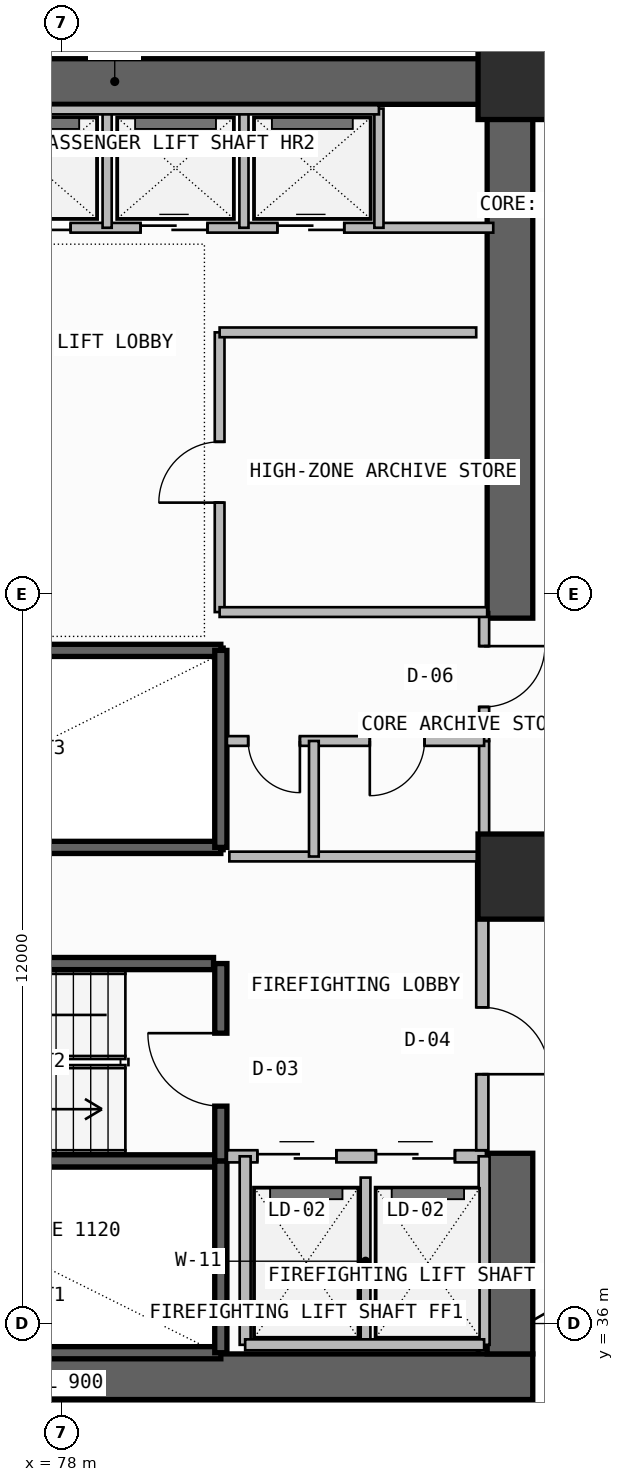
"""IFC4 building model, lengths in metres.
Left out: names, types, materials, properties, quantities, classifications, styles, units other than length and angle.
Written with IfcOpenShell. Run it as: python <this file> out.ifc"""

import sys

from ifc_helpers import new_model, si_unit, direction, frame, frame_2d, origin, origin_2d, place, context, subcontext, project, spatial, rectangle, extrude, element, fill, save


model = new_model("IFC4")
c1 = context("Model", 3, precision=1e-05, world=origin(), true_north=direction((0.0, 1.0)))
c2 = subcontext(c1, "Body", "Model", "MODEL_VIEW")
j1 = project(units=[si_unit("LENGTHUNIT", "METRE"), si_unit("PLANEANGLEUNIT", "RADIAN")], contexts=[c1])
p1 = place(None, origin())
s1 = spatial("IfcSite", under=j1, at=p1, CompositionType="ELEMENT")
p2 = place(p1, origin())
s2 = spatial("IfcBuilding", under=s1, at=p2, CompositionType="ELEMENT")
p3 = place(p2, frame((0.0, 0.0, 214.98)))
s3 = spatial("IfcBuildingStorey", under=s2, at=p3, CompositionType="ELEMENT", Elevation=214.98)
p4 = place(p3, frame((72.15, 35.125, -0.26), z_axis=(0.0, 0.0, 1.0), x_axis=(1.0, 0.0, 0.0)))
e1 = element("IfcWall", 1, at=p4, inside=s3, PredefinedType="SHEAR", context=c2, shape_type="SweptSolid", body=[
    extrude(rectangle(XDim=13.6, YDim=0.75, at=frame_2d((6.8, 0.0))), origin(), (0.0, 0.0, 1.0), 3.52),
])
p5 = place(p3, frame((85.375, 35.5, -0.26), z_axis=(0.0, 0.0, 1.0), x_axis=(0.0, 1.0, 0.0)))
e2 = element("IfcWall", 2, at=p5, inside=s3, PredefinedType="SHEAR", context=c2, shape_type="SweptSolid", body=[
    extrude(rectangle(XDim=3.3, YDim=0.75, at=frame_2d((1.65, 0.0))), origin(), (0.0, 0.0, 1.0), 3.52),
])
p6 = place(p3, frame((72.0, 56.425, -0.26), z_axis=(0.0, 0.0, 1.0), x_axis=(1.0, 0.0, 0.0)))
e3 = element("IfcWall", 3, at=p6, inside=s3, PredefinedType="SHEAR", context=c2, shape_type="SweptSolid", body=[
    extrude(rectangle(XDim=13.75, YDim=0.75, at=frame_2d((6.875, 0.0))), origin(), (0.0, 0.0, 1.0), 3.52),
])
p7 = place(p3, frame((85.375, 47.6, -0.26), z_axis=(0.0, 0.0, 1.0), x_axis=(0.0, 1.0, 0.0)))
e4 = element("IfcWall", 4, at=p7, inside=s3, PredefinedType="SHEAR", context=c2, shape_type="SweptSolid", body=[
    extrude(rectangle(XDim=8.45, YDim=0.75, at=frame_2d((4.225, 0.0))), origin(), (0.0, 0.0, 1.0), 3.52),
])
for number, where, z_axis, x_axis in (
    (5, (85.55, 43.35, 0.0), (0.0, 0.0, 1.0), (1.0, 0.0, 0.0)),
    (6, (85.55, 56.5, 0.0), (0.0, 0.0, 1.0), (1.0, 0.0, 0.0)),
):
    element("IfcColumn", number, at=place(p3, frame(where, z_axis=z_axis, x_axis=x_axis)), inside=s3, PredefinedType="COLUMN", context=c2, shape_type="SweptSolid", body=[
        extrude(rectangle(XDim=1.4, YDim=1.4, at=origin_2d()), origin(), (0.0, 0.0, 1.0), 3.52),
    ])
p8 = place(p3, frame((116.396, 56.722, 0.0), z_axis=(0.0, 0.0, 1.0), x_axis=(-0.977936620644, 0.208901809478, 0.0)))
e7 = element("IfcWall", 7, at=p8, inside=s3, PredefinedType="PARAPET", context=c2, shape_type="SweptSolid", body=[
    extrude(rectangle(XDim=31.685, YDim=0.2, at=frame_2d((15.843, 0.0))), origin(), (0.0, 0.0, 1.0), 1.15),
])
for number, where, z_axis, x_axis in (
    (8, (72.92, 35.52, -0.26), (0.0, 0.0, 1.0), (1.0, 0.0, 0.0)),
    (9, (72.92, 38.675, -0.26), (0.0, 0.0, 1.0), (1.0, 0.0, 0.0)),
):
    element("IfcWall", number, at=place(p3, frame(where, z_axis=z_axis, x_axis=x_axis)), inside=s3, PredefinedType="SOLIDWALL", context=c2, shape_type="SweptSolid", body=[
        extrude(rectangle(XDim=7.7, YDim=0.2, at=frame_2d((3.85, 0.0))), origin(), (0.0, 0.0, 1.0), 3.52),
    ])
p9 = place(p3, frame((80.62, 35.52, -0.26), z_axis=(0.0, 0.0, 1.0), x_axis=(0.0, 1.0, 0.0)))
e10 = element("IfcWall", 10, at=p9, inside=s3, PredefinedType="SOLIDWALL", context=c2, shape_type="SweptSolid", body=[
    extrude(rectangle(XDim=3.155, YDim=0.2, at=frame_2d((1.578, 0.0))), origin(), (0.0, 0.0, 1.0), 3.52),
])
p10 = place(p3, frame((80.62, 38.675, -0.26), z_axis=(0.0, 0.0, 1.0), x_axis=(0.0, 1.0, 0.0)))
e11 = element("IfcWall", 11, at=p10, inside=s3, PredefinedType="SOLIDWALL", context=c2, shape_type="SweptSolid", body=[
    extrude(rectangle(XDim=3.245, YDim=0.2, at=frame_2d((1.623, 0.0))), origin(), (0.0, 0.0, 1.0), 3.52),
])
p11 = place(p10, frame((0.9, 0.0, 0.26)))
e12 = element("IfcOpeningElement", 12, at=p11, cuts=e11, PredefinedType="OPENING", context=c2, shape_type="SweptSolid", body=[
    extrude(rectangle(XDim=1.2, YDim=2.2, at=frame_2d((0.6, 1.1))), frame((0.0, 0.11, 0.0), z_axis=(0.0, -1.0, 0.0), x_axis=(1.0, 0.0, 0.0)), (0.0, 0.0, 1.0), 0.22),
])
p12 = place(p3, frame((80.72, 38.75, 0.0), z_axis=(0.0, 0.0, 1.0), x_axis=(1.0, 0.0, 0.0)))
e13 = element("IfcWall", 13, at=p12, inside=s3, PredefinedType="SOLIDWALL", context=c2, shape_type="SweptSolid", body=[
    extrude(rectangle(XDim=4.26, YDim=0.2, at=frame_2d((2.13, 0.0))), origin(), (0.0, 0.0, 1.0), 3.26),
])
p13 = place(p12, frame((0.5, 0.0, 0.0)))
e14 = element("IfcOpeningElement", 14, at=p13, cuts=e13, PredefinedType="OPENING", context=c2, shape_type="SweptSolid", body=[
    extrude(rectangle(XDim=1.3, YDim=2.3, at=frame_2d((0.65, 1.15))), frame((0.0, 0.11, 0.0), z_axis=(0.0, -1.0, 0.0), x_axis=(1.0, 0.0, 0.0)), (0.0, 0.0, 1.0), 0.22),
])
p14 = place(p12, frame((2.45, 0.0, 0.0)))
e15 = element("IfcOpeningElement", 15, at=p14, cuts=e13, PredefinedType="OPENING", context=c2, shape_type="SweptSolid", body=[
    extrude(rectangle(XDim=1.3, YDim=2.3, at=frame_2d((0.65, 1.15))), frame((0.0, 0.11, 0.0), z_axis=(0.0, -1.0, 0.0), x_axis=(1.0, 0.0, 0.0)), (0.0, 0.0, 1.0), 0.22),
])
p15 = place(p3, frame((83.0, 35.65, 0.0), z_axis=(0.0, 0.0, 1.0), x_axis=(0.0, 1.0, 0.0)))
e16 = element("IfcWall", 16, at=p15, inside=s3, PredefinedType="PLUMBINGWALL", context=c2, shape_type="SweptSolid", body=[
    extrude(rectangle(XDim=2.75, YDim=0.16, at=frame_2d((1.375, 0.0))), origin(), (0.0, 0.0, 1.0), 3.26),
])
for number, where, z_axis, x_axis in (
    (17, (84.95, 35.65, 0.0), (0.0, 0.0, 1.0), (0.0, 1.0, 0.0)),
    (18, (81.02, 35.65, 0.0), (0.0, 0.0, 1.0), (0.0, 1.0, 0.0)),
):
    element("IfcWall", number, at=place(p3, frame(where, z_axis=z_axis, x_axis=x_axis)), inside=s3, PredefinedType="SOLIDWALL", context=c2, shape_type="SweptSolid", body=[
        extrude(rectangle(XDim=3.1, YDim=0.18, at=frame_2d((1.55, 0.0))), origin(), (0.0, 0.0, 1.0), 3.26),
    ])
p16 = place(p3, frame((81.02, 35.65, 0.0), z_axis=(0.0, 0.0, 1.0), x_axis=(1.0, 0.0, 0.0)))
e19 = element("IfcWall", 19, at=p16, inside=s3, PredefinedType="SOLIDWALL", context=c2, shape_type="SweptSolid", body=[
    extrude(rectangle(XDim=3.93, YDim=0.18, at=frame_2d((1.965, 0.0))), origin(), (0.0, 0.0, 1.0), 3.26),
])
p17 = place(p3, frame((84.92, 38.85, 0.0), z_axis=(0.0, 0.0, 1.0), x_axis=(0.0, 1.0, 0.0)))
e20 = element("IfcWall", 20, at=p17, inside=s3, PredefinedType="SOLIDWALL", context=c2, shape_type="SweptSolid", body=[
    extrude(rectangle(XDim=4.83, YDim=0.2, at=frame_2d((2.415, 0.0))), origin(), (0.0, 0.0, 1.0), 3.26),
])
p18 = place(p17, frame((1.25, 0.0, 0.0)))
e21 = element("IfcOpeningElement", 21, at=p18, cuts=e20, PredefinedType="OPENING", context=c2, shape_type="SweptSolid", body=[
    extrude(rectangle(XDim=1.1, YDim=2.2, at=frame_2d((0.55, 1.1))), frame((0.0, 0.11, 0.0), z_axis=(0.0, -1.0, 0.0), x_axis=(1.0, 0.0, 0.0)), (0.0, 0.0, 1.0), 0.22),
])
p19 = place(p3, frame((72.92, 41.92, -0.26), z_axis=(0.0, 0.0, 1.0), x_axis=(1.0, 0.0, 0.0)))
e22 = element("IfcWall", 22, at=p19, inside=s3, PredefinedType="SOLIDWALL", context=c2, shape_type="SweptSolid", body=[
    extrude(rectangle(XDim=7.58, YDim=0.2, at=frame_2d((3.79, 0.0))), origin(), (0.0, 0.0, 1.0), 3.52),
])
for number, where, z_axis, x_axis in (
    (23, (72.92, 43.83, -0.26), (0.0, 0.0, 1.0), (1.0, 0.0, 0.0)),
    (24, (72.92, 47.07, -0.26), (0.0, 0.0, 1.0), (1.0, 0.0, 0.0)),
):
    element("IfcWall", number, at=place(p3, frame(where, z_axis=z_axis, x_axis=x_axis)), inside=s3, PredefinedType="SOLIDWALL", context=c2, shape_type="SweptSolid", body=[
        extrude(rectangle(XDim=7.7, YDim=0.2, at=frame_2d((3.85, 0.0))), origin(), (0.0, 0.0, 1.0), 3.52),
    ])
p20 = place(p3, frame((80.62, 43.83, -0.26), z_axis=(0.0, 0.0, 1.0), x_axis=(0.0, 1.0, 0.0)))
e25 = element("IfcWall", 25, at=p20, inside=s3, PredefinedType="SOLIDWALL", context=c2, shape_type="SweptSolid", body=[
    extrude(rectangle(XDim=3.24, YDim=0.2, at=frame_2d((1.62, 0.0))), origin(), (0.0, 0.0, 1.0), 3.52),
])
p21 = place(p3, frame((84.95, 43.68, 0.0), z_axis=(0.0, 0.0, 1.0), x_axis=(0.0, 1.0, 0.0)))
e26 = element("IfcWall", 26, at=p21, inside=s3, PredefinedType="PLUMBINGWALL", context=c2, shape_type="SweptSolid", body=[
    extrude(rectangle(XDim=1.9, YDim=0.165, at=frame_2d((0.95, 0.0))), origin(), (0.0, 0.0, 1.0), 3.26),
])
p22 = place(p3, frame((84.95, 45.58, 0.0), z_axis=(0.0, 0.0, 1.0), x_axis=(0.0, 1.0, 0.0)))
e27 = element("IfcWall", 27, at=p22, inside=s3, PredefinedType="PARTITIONING", context=c2, shape_type="SweptSolid", body=[
    extrude(rectangle(XDim=2.12, YDim=0.165, at=frame_2d((1.06, 0.0))), origin(), (0.0, 0.0, 1.0), 3.26),
])
p23 = place(p22, frame((0.56, 0.0, 0.0)))
e28 = element("IfcOpeningElement", 28, at=p23, cuts=e27, PredefinedType="OPENING", context=c2, shape_type="SweptSolid", body=[
    extrude(rectangle(XDim=1.0, YDim=2.2, at=frame_2d((0.5, 1.1))), frame((0.0, 0.093, 0.0), z_axis=(0.0, -1.0, 0.0), x_axis=(1.0, 0.0, 0.0)), (0.0, 0.0, 1.0), 0.185),
])
p24 = place(p3, frame((80.72, 45.58, 0.0), z_axis=(0.0, 0.0, 1.0), x_axis=(1.0, 0.0, 0.0)))
e29 = element("IfcWall", 29, at=p24, inside=s3, PredefinedType="PLUMBINGWALL", context=c2, shape_type="SweptSolid", body=[
    extrude(rectangle(XDim=4.23, YDim=0.16, at=frame_2d((2.115, 0.0))), origin(), (0.0, 0.0, 1.0), 3.26),
])
p25 = place(p24, frame((0.35, 0.0, 0.0)))
e30 = element("IfcOpeningElement", 30, at=p25, cuts=e29, PredefinedType="OPENING", context=c2, shape_type="SweptSolid", body=[
    extrude(rectangle(XDim=0.85, YDim=2.05, at=frame_2d((0.425, 1.025))), frame((0.0, 0.09, 0.0), z_axis=(0.0, -1.0, 0.0), x_axis=(1.0, 0.0, 0.0)), (0.0, 0.0, 1.0), 0.18),
])
p26 = place(p24, frame((2.35, 0.0, 0.0)))
e31 = element("IfcOpeningElement", 31, at=p26, cuts=e29, PredefinedType="OPENING", context=c2, shape_type="SweptSolid", body=[
    extrude(rectangle(XDim=0.9, YDim=2.1, at=frame_2d((0.45, 1.05))), frame((0.0, 0.09, 0.0), z_axis=(0.0, -1.0, 0.0), x_axis=(1.0, 0.0, 0.0)), (0.0, 0.0, 1.0), 0.18),
])
p27 = place(p3, frame((80.76, 43.68, 0.0), z_axis=(0.0, 0.0, 1.0), x_axis=(1.0, 0.0, 0.0)))
e32 = element("IfcWall", 32, at=p27, inside=s3, PredefinedType="PLUMBINGWALL", context=c2, shape_type="SweptSolid", body=[
    extrude(rectangle(XDim=4.19, YDim=0.16, at=frame_2d((2.095, 0.0))), origin(), (0.0, 0.0, 1.0), 3.26),
])
p28 = place(p3, frame((82.15, 43.68, 0.0), z_axis=(0.0, 0.0, 1.0), x_axis=(0.0, 1.0, 0.0)))
e33 = element("IfcWall", 33, at=p28, inside=s3, PredefinedType="PLUMBINGWALL", context=c2, shape_type="SweptSolid", body=[
    extrude(rectangle(XDim=1.9, YDim=0.16, at=frame_2d((0.95, 0.0))), origin(), (0.0, 0.0, 1.0), 3.26),
])
p29 = place(p3, frame((80.6, 47.7, 0.0), z_axis=(0.0, 0.0, 1.0), x_axis=(0.0, 1.0, 0.0)))
e34 = element("IfcWall", 34, at=p29, inside=s3, PredefinedType="SOLIDWALL", context=c2, shape_type="SweptSolid", body=[
    extrude(rectangle(XDim=4.6, YDim=0.16, at=frame_2d((2.3, 0.0))), origin(), (0.0, 0.0, 1.0), 3.26),
])
p30 = place(p29, frame((1.8, 0.0, 0.0)))
e35 = element("IfcOpeningElement", 35, at=p30, cuts=e34, PredefinedType="OPENING", context=c2, shape_type="SweptSolid", body=[
    extrude(rectangle(XDim=1.0, YDim=2.2, at=frame_2d((0.5, 1.1))), frame((0.0, 0.09, 0.0), z_axis=(0.0, -1.0, 0.0), x_axis=(1.0, 0.0, 0.0)), (0.0, 0.0, 1.0), 0.18),
])
p31 = place(p3, frame((80.6, 47.7, 0.0), z_axis=(0.0, 0.0, 1.0), x_axis=(1.0, 0.0, 0.0)))
e36 = element("IfcWall", 36, at=p31, inside=s3, PredefinedType="SOLIDWALL", context=c2, shape_type="SweptSolid", body=[
    extrude(rectangle(XDim=4.4, YDim=0.16, at=frame_2d((2.2, 0.0))), origin(), (0.0, 0.0, 1.0), 3.26),
])
p32 = place(p3, frame((80.6, 52.3, 0.0), z_axis=(0.0, 0.0, 1.0), x_axis=(1.0, 0.0, 0.0)))
e37 = element("IfcWall", 37, at=p32, inside=s3, PredefinedType="SOLIDWALL", context=c2, shape_type="SweptSolid", body=[
    extrude(rectangle(XDim=4.22, YDim=0.16, at=frame_2d((2.11, 0.0))), origin(), (0.0, 0.0, 1.0), 3.26),
])
p33 = place(p3, frame((73.02, 54.02, 0.0), z_axis=(0.0, 0.0, 1.0), x_axis=(1.0, 0.0, 0.0)))
e38 = element("IfcWall", 38, at=p33, inside=s3, PredefinedType="SOLIDWALL", context=c2, shape_type="SweptSolid", body=[
    extrude(rectangle(XDim=12.08, YDim=0.16, at=frame_2d((6.04, 0.0))), origin(), (0.0, 0.0, 1.0), 3.26),
])
p34 = place(p33, frame((4.03, 0.0, 0.0)))
e39 = element("IfcOpeningElement", 39, at=p34, cuts=e38, PredefinedType="OPENING", context=c2, shape_type="SweptSolid", body=[
    extrude(rectangle(XDim=1.1, YDim=2.25, at=frame_2d((0.55, 1.125))), frame((0.0, 0.09, 0.0), z_axis=(0.0, -1.0, 0.0), x_axis=(1.0, 0.0, 0.0)), (0.0, 0.0, 1.0), 0.18),
])
p35 = place(p33, frame((6.28, 0.0, 0.0)))
e40 = element("IfcOpeningElement", 40, at=p35, cuts=e38, PredefinedType="OPENING", context=c2, shape_type="SweptSolid", body=[
    extrude(rectangle(XDim=1.1, YDim=2.25, at=frame_2d((0.55, 1.125))), frame((0.0, 0.09, 0.0), z_axis=(0.0, -1.0, 0.0), x_axis=(1.0, 0.0, 0.0)), (0.0, 0.0, 1.0), 0.18),
])
p36 = place(p33, frame((8.53, 0.0, 0.0)))
e41 = element("IfcOpeningElement", 41, at=p36, cuts=e38, PredefinedType="OPENING", context=c2, shape_type="SweptSolid", body=[
    extrude(rectangle(XDim=1.1, YDim=2.25, at=frame_2d((0.55, 1.125))), frame((0.0, 0.09, 0.0), z_axis=(0.0, -1.0, 0.0), x_axis=(1.0, 0.0, 0.0)), (0.0, 0.0, 1.0), 0.18),
])
for number, where, z_axis, x_axis in (
    (42, (78.75, 54.02, 0.0), (0.0, 0.0, 1.0), (0.0, 1.0, 0.0)),
    (43, (81.0, 54.02, 0.0), (0.0, 0.0, 1.0), (0.0, 1.0, 0.0)),
):
    element("IfcWall", number, at=place(p3, frame(where, z_axis=z_axis, x_axis=x_axis)), inside=s3, PredefinedType="PLUMBINGWALL", context=c2, shape_type="SweptSolid", body=[
        extrude(rectangle(XDim=1.96, YDim=0.15, at=frame_2d((0.98, 0.0))), origin(), (0.0, 0.0, 1.0), 3.26),
    ])
p37 = place(p3, frame((83.22, 54.02, 0.0), z_axis=(0.0, 0.0, 1.0), x_axis=(0.0, 1.0, 0.0)))
e44 = element("IfcWall", 44, at=p37, inside=s3, PredefinedType="SOLIDWALL", context=c2, shape_type="SweptSolid", body=[
    extrude(rectangle(XDim=1.96, YDim=0.15, at=frame_2d((0.98, 0.0))), origin(), (0.0, 0.0, 1.0), 3.26),
])
p38 = place(p3, frame((76.52, 55.96, 0.0), z_axis=(0.0, 0.0, 1.0), x_axis=(1.0, 0.0, 0.0)))
e45 = element("IfcWall", 45, at=p38, inside=s3, PredefinedType="SOLIDWALL", context=c2, shape_type="SweptSolid", body=[
    extrude(rectangle(XDim=6.7, YDim=0.15, at=frame_2d((3.35, 0.0))), origin(), (0.0, 0.0, 1.0), 3.26),
])
p39 = place(p11, origin())
e46 = element("IfcDoor", 46, at=p39, inside=s3, OperationType="SINGLE_SWING_RIGHT", PredefinedType="USERDEFINED", context=c2, shape_type="SweptSolid", body=[
    extrude(rectangle(XDim=1.2, YDim=2.2, at=frame_2d((0.6, 1.1))), frame((0.0, 0.025, 0.0), z_axis=(0.0, -1.0, 0.0), x_axis=(1.0, 0.0, 0.0)), (0.0, 0.0, 1.0), 0.05),
])
fill(e12, e46)
p40 = place(p13, origin())
e47 = element("IfcDoor", 47, at=p40, inside=s3, OperationType="DOUBLE_DOOR_SLIDING", PredefinedType="DOOR", context=c2, shape_type="SweptSolid", body=[
    extrude(rectangle(XDim=1.3, YDim=2.3, at=frame_2d((0.65, 1.15))), frame((0.0, 0.025, 0.0), z_axis=(0.0, -1.0, 0.0), x_axis=(1.0, 0.0, 0.0)), (0.0, 0.0, 1.0), 0.05),
])
fill(e14, e47)
p41 = place(p14, origin())
e48 = element("IfcDoor", 48, at=p41, inside=s3, OperationType="DOUBLE_DOOR_SLIDING", PredefinedType="DOOR", context=c2, shape_type="SweptSolid", body=[
    extrude(rectangle(XDim=1.3, YDim=2.3, at=frame_2d((0.65, 1.15))), frame((0.0, 0.025, 0.0), z_axis=(0.0, -1.0, 0.0), x_axis=(1.0, 0.0, 0.0)), (0.0, 0.0, 1.0), 0.05),
])
fill(e15, e48)
p42 = place(p18, frame((1.1, 0.0, 0.0), z_axis=(0.0, 0.0, 1.0), x_axis=(-1.0, 0.0, 0.0)))
e49 = element("IfcDoor", 49, at=p42, inside=s3, OperationType="SINGLE_SWING_RIGHT", PredefinedType="DOOR", context=c2, shape_type="SweptSolid", body=[
    extrude(rectangle(XDim=1.1, YDim=2.2, at=frame_2d((0.55, 1.1))), frame((0.0, 0.025, 0.0), z_axis=(0.0, -1.0, 0.0), x_axis=(1.0, 0.0, 0.0)), (0.0, 0.0, 1.0), 0.05),
])
fill(e21, e49)
p43 = place(p23, frame((1.0, 0.0, 0.0), z_axis=(0.0, 0.0, 1.0), x_axis=(-1.0, 0.0, 0.0)))
e50 = element("IfcDoor", 50, at=p43, inside=s3, OperationType="SINGLE_SWING_LEFT", PredefinedType="DOOR", context=c2, shape_type="SweptSolid", body=[
    extrude(rectangle(XDim=1.0, YDim=2.2, at=frame_2d((0.5, 1.1))), frame((0.0, 0.025, 0.0), z_axis=(0.0, -1.0, 0.0), x_axis=(1.0, 0.0, 0.0)), (0.0, 0.0, 1.0), 0.05),
])
fill(e28, e50)
p44 = place(p25, frame((0.85, 0.0, 0.0), z_axis=(0.0, 0.0, 1.0), x_axis=(-1.0, 0.0, 0.0)))
e51 = element("IfcDoor", 51, at=p44, inside=s3, OperationType="SINGLE_SWING_LEFT", PredefinedType="DOOR", context=c2, shape_type="SweptSolid", body=[
    extrude(rectangle(XDim=0.85, YDim=2.05, at=frame_2d((0.425, 1.025))), frame((0.0, 0.025, 0.0), z_axis=(0.0, -1.0, 0.0), x_axis=(1.0, 0.0, 0.0)), (0.0, 0.0, 1.0), 0.05),
])
fill(e30, e51)
p45 = place(p26, frame((0.9, 0.0, 0.0), z_axis=(0.0, 0.0, 1.0), x_axis=(-1.0, 0.0, 0.0)))
e52 = element("IfcDoor", 52, at=p45, inside=s3, OperationType="SINGLE_SWING_RIGHT", PredefinedType="DOOR", context=c2, shape_type="SweptSolid", body=[
    extrude(rectangle(XDim=0.9, YDim=2.1, at=frame_2d((0.45, 1.05))), frame((0.0, 0.025, 0.0), z_axis=(0.0, -1.0, 0.0), x_axis=(1.0, 0.0, 0.0)), (0.0, 0.0, 1.0), 0.05),
])
fill(e31, e52)
p46 = place(p30, origin())
e53 = element("IfcDoor", 53, at=p46, inside=s3, OperationType="SINGLE_SWING_LEFT", PredefinedType="DOOR", context=c2, shape_type="SweptSolid", body=[
    extrude(rectangle(XDim=1.0, YDim=2.2, at=frame_2d((0.5, 1.1))), frame((0.0, 0.025, 0.0), z_axis=(0.0, -1.0, 0.0), x_axis=(1.0, 0.0, 0.0)), (0.0, 0.0, 1.0), 0.05),
])
fill(e35, e53)
p47 = place(p34, origin())
e54 = element("IfcDoor", 54, at=p47, inside=s3, OperationType="DOUBLE_DOOR_SLIDING", PredefinedType="DOOR", context=c2, shape_type="SweptSolid", body=[
    extrude(rectangle(XDim=1.1, YDim=2.25, at=frame_2d((0.55, 1.125))), frame((0.0, 0.025, 0.0), z_axis=(0.0, -1.0, 0.0), x_axis=(1.0, 0.0, 0.0)), (0.0, 0.0, 1.0), 0.05),
])
fill(e39, e54)
p48 = place(p35, origin())
e55 = element("IfcDoor", 55, at=p48, inside=s3, OperationType="DOUBLE_DOOR_SLIDING", PredefinedType="DOOR", context=c2, shape_type="SweptSolid", body=[
    extrude(rectangle(XDim=1.1, YDim=2.25, at=frame_2d((0.55, 1.125))), frame((0.0, 0.025, 0.0), z_axis=(0.0, -1.0, 0.0), x_axis=(1.0, 0.0, 0.0)), (0.0, 0.0, 1.0), 0.05),
])
fill(e40, e55)
p49 = place(p36, origin())
e56 = element("IfcDoor", 56, at=p49, inside=s3, OperationType="DOUBLE_DOOR_SLIDING", PredefinedType="DOOR", context=c2, shape_type="SweptSolid", body=[
    extrude(rectangle(XDim=1.1, YDim=2.25, at=frame_2d((0.55, 1.125))), frame((0.0, 0.025, 0.0), z_axis=(0.0, -1.0, 0.0), x_axis=(1.0, 0.0, 0.0)), (0.0, 0.0, 1.0), 0.05),
])
fill(e41, e56)
save(model, sys.argv[1])
